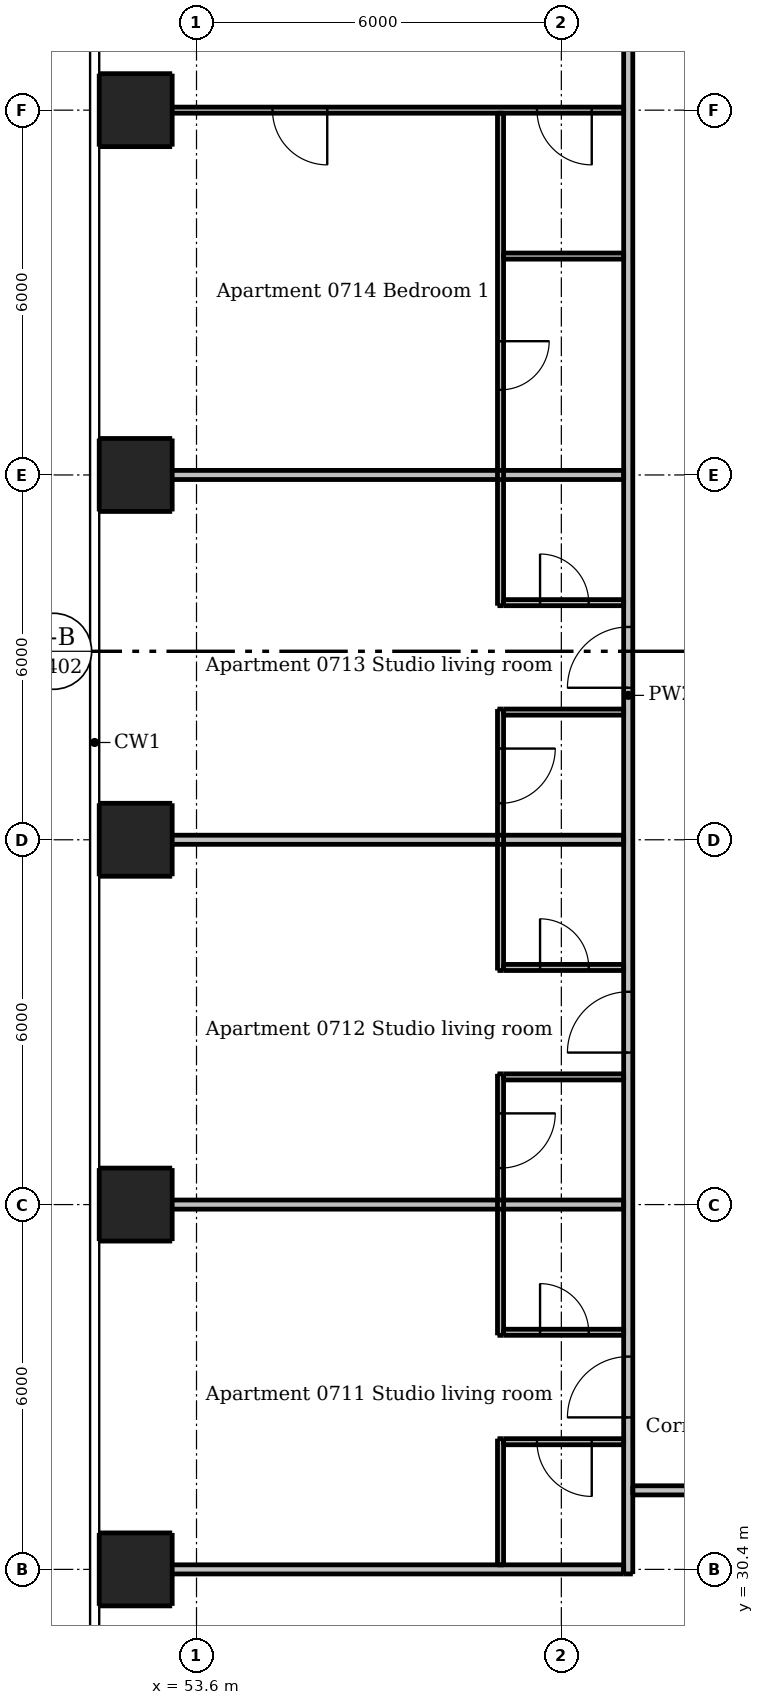
"""IFC4 building model, lengths in metres.
Left out: names, types, materials, properties, quantities, classifications, styles, units other than length and angle.
Written with IfcOpenShell. Run it as: python <this file> out.ifc"""

import sys

from ifc_helpers import new_model, si_unit, direction, frame, frame_2d, origin, origin_2d, place, context, subcontext, project, spatial, rectangle, extrude, element, fill, save


model = new_model("IFC4")
c1 = context("Model", 3, precision=1e-05, world=origin(), true_north=direction((0.0, 1.0)))
c2 = subcontext(c1, "Body", "Model", "MODEL_VIEW")
j1 = project(units=[si_unit("LENGTHUNIT", "METRE"), si_unit("PLANEANGLEUNIT", "RADIAN")], contexts=[c1])
p1 = place(None, origin())
s1 = spatial("IfcSite", under=j1, at=p1, CompositionType="ELEMENT")
p2 = place(p1, origin())
s2 = spatial("IfcBuilding", under=s1, at=p2, CompositionType="ELEMENT")
p3 = place(p2, frame((0.0, 0.0, 30.1)))
s3 = spatial("IfcBuildingStorey", under=s2, at=p3, CompositionType="ELEMENT", Elevation=30.1)
for number, where, z_axis, x_axis in (
    (1, (52.6, 30.4, 0.0), (0.0, 0.0, 1.0), (1.0, 0.0, 0.0)),
    (2, (52.6, 36.4, 0.0), (0.0, 0.0, 1.0), (1.0, 0.0, 0.0)),
    (3, (52.6, 42.4, 0.0), (0.0, 0.0, 1.0), (1.0, 0.0, 0.0)),
    (4, (52.6, 48.4, 0.0), (0.0, 0.0, 1.0), (1.0, 0.0, 0.0)),
    (5, (52.6, 54.4, 0.0), (0.0, 0.0, 1.0), (1.0, 0.0, 0.0)),
):
    element("IfcColumn", number, at=place(p3, frame(where, z_axis=z_axis, x_axis=x_axis)), inside=s3, PredefinedType="COLUMN", context=c2, shape_type="SweptSolid", body=[
        extrude(rectangle(XDim=1.2, YDim=1.2, at=origin_2d()), origin(), (0.0, 0.0, 1.0), 3.05),
    ])
p4 = place(p3, frame((58.6, 30.475, 0.0), z_axis=(0.0, 0.0, 1.0), x_axis=(0.0, 1.0, 0.0)))
e6 = element("IfcWall", 6, at=p4, inside=s3, PredefinedType="PARTITIONING", context=c2, shape_type="SweptSolid", body=[
    extrude(rectangle(XDim=2.075, YDim=0.1, at=frame_2d((1.038, 0.0))), origin(), (0.0, 0.0, 1.0), 3.05),
])
p5 = place(p3, frame((58.6, 38.55, 0.0), z_axis=(0.0, 0.0, 1.0), x_axis=(0.0, -1.0, 0.0)))
e7 = element("IfcWall", 7, at=p5, inside=s3, PredefinedType="PARTITIONING", context=c2, shape_type="SweptSolid", body=[
    extrude(rectangle(XDim=4.3, YDim=0.1, at=frame_2d((2.15, 0.0))), origin(), (0.0, 0.0, 1.0), 3.05),
])
p6 = place(p5, frame((0.65, 0.0, 0.0)))
e8 = element("IfcOpeningElement", 8, at=p6, cuts=e7, PredefinedType="OPENING", context=c2, shape_type="SweptSolid", body=[
    extrude(rectangle(XDim=0.9, YDim=2.1, at=frame_2d((0.45, 1.05))), frame((0.0, 0.06, 0.0), z_axis=(0.0, -1.0, 0.0), x_axis=(1.0, 0.0, 0.0)), (0.0, 0.0, 1.0), 0.12),
])
p7 = place(p3, frame((58.6, 44.55, 0.0), z_axis=(0.0, 0.0, 1.0), x_axis=(0.0, -1.0, 0.0)))
e9 = element("IfcWall", 9, at=p7, inside=s3, PredefinedType="PARTITIONING", context=c2, shape_type="SweptSolid", body=[
    extrude(rectangle(XDim=4.3, YDim=0.1, at=frame_2d((2.15, 0.0))), origin(), (0.0, 0.0, 1.0), 3.05),
])
p8 = place(p7, frame((0.65, 0.0, 0.0)))
e10 = element("IfcOpeningElement", 10, at=p8, cuts=e9, PredefinedType="OPENING", context=c2, shape_type="SweptSolid", body=[
    extrude(rectangle(XDim=0.9, YDim=2.1, at=frame_2d((0.45, 1.05))), frame((0.0, 0.06, 0.0), z_axis=(0.0, -1.0, 0.0), x_axis=(1.0, 0.0, 0.0)), (0.0, 0.0, 1.0), 0.12),
])
p9 = place(p3, frame((58.6, 54.35, 0.0), z_axis=(0.0, 0.0, 1.0), x_axis=(0.0, -1.0, 0.0)))
e11 = element("IfcWall", 11, at=p9, inside=s3, PredefinedType="PARTITIONING", context=c2, shape_type="SweptSolid", body=[
    extrude(rectangle(XDim=8.1, YDim=0.1, at=frame_2d((4.05, 0.0))), origin(), (0.0, 0.0, 1.0), 3.05),
])
p10 = place(p9, frame((3.75, 0.0, 0.0)))
e12 = element("IfcOpeningElement", 12, at=p10, cuts=e11, PredefinedType="OPENING", context=c2, shape_type="SweptSolid", body=[
    extrude(rectangle(XDim=0.8, YDim=2.1, at=frame_2d((0.4, 1.05))), frame((0.0, 0.06, 0.0), z_axis=(0.0, -1.0, 0.0), x_axis=(1.0, 0.0, 0.0)), (0.0, 0.0, 1.0), 0.12),
])
p11 = place(p3, frame((60.625, 54.4, 0.0), z_axis=(0.0, 0.0, 1.0), x_axis=(-1.0, 0.0, 0.0)))
e13 = element("IfcWall", 13, at=p11, inside=s3, PredefinedType="PARTITIONING", context=c2, shape_type="SweptSolid", body=[
    extrude(rectangle(XDim=8.625, YDim=0.1, at=frame_2d((4.312, 0.0))), origin(), (0.0, 0.0, 1.0), 2.516),
])
p12 = place(p11, frame((0.525, 0.0, 0.0)))
e14 = element("IfcOpeningElement", 14, at=p12, cuts=e13, PredefinedType="OPENING", context=c2, shape_type="SweptSolid", body=[
    extrude(rectangle(XDim=0.9, YDim=2.1, at=frame_2d((0.45, 1.05))), frame((0.0, 0.06, 0.0), z_axis=(0.0, -1.0, 0.0), x_axis=(1.0, 0.0, 0.0)), (0.0, 0.0, 1.0), 0.12),
])
p13 = place(p11, frame((4.875, 0.0, 0.0)))
e15 = element("IfcOpeningElement", 15, at=p13, cuts=e13, PredefinedType="OPENING", context=c2, shape_type="SweptSolid", body=[
    extrude(rectangle(XDim=0.9, YDim=2.1, at=frame_2d((0.45, 1.05))), frame((0.0, 0.06, 0.0), z_axis=(0.0, -1.0, 0.0), x_axis=(1.0, 0.0, 0.0)), (0.0, 0.0, 1.0), 0.12),
])
p14 = place(p3, frame((58.65, 52.0, 0.0), z_axis=(0.0, 0.0, 1.0), x_axis=(1.0, 0.0, 0.0)))
e16 = element("IfcWall", 16, at=p14, inside=s3, PredefinedType="PARTITIONING", context=c2, shape_type="SweptSolid", body=[
    extrude(rectangle(XDim=1.975, YDim=0.1, at=frame_2d((0.988, 0.0))), origin(), (0.0, 0.0, 1.0), 3.05),
])
p15 = place(p3, frame((58.65, 46.3, 0.0), z_axis=(0.0, 0.0, 1.0), x_axis=(1.0, 0.0, 0.0)))
e17 = element("IfcWall", 17, at=p15, inside=s3, PredefinedType="PARTITIONING", context=c2, shape_type="SweptSolid", body=[
    extrude(rectangle(XDim=1.975, YDim=0.1, at=frame_2d((0.988, 0.0))), origin(), (0.0, 0.0, 1.0), 3.05),
])
p16 = place(p15, frame((0.6, 0.0, 0.0)))
e18 = element("IfcOpeningElement", 18, at=p16, cuts=e17, PredefinedType="OPENING", context=c2, shape_type="SweptSolid", body=[
    extrude(rectangle(XDim=0.8, YDim=2.1, at=frame_2d((0.4, 1.05))), frame((0.0, 0.06, 0.0), z_axis=(0.0, -1.0, 0.0), x_axis=(1.0, 0.0, 0.0)), (0.0, 0.0, 1.0), 0.12),
])
p17 = place(p3, frame((58.65, 44.5, 0.0), z_axis=(0.0, 0.0, 1.0), x_axis=(1.0, 0.0, 0.0)))
e19 = element("IfcWall", 19, at=p17, inside=s3, PredefinedType="PARTITIONING", context=c2, shape_type="SweptSolid", body=[
    extrude(rectangle(XDim=1.975, YDim=0.1, at=frame_2d((0.988, 0.0))), origin(), (0.0, 0.0, 1.0), 3.05),
])
p18 = place(p3, frame((58.65, 40.3, 0.0), z_axis=(0.0, 0.0, 1.0), x_axis=(1.0, 0.0, 0.0)))
e20 = element("IfcWall", 20, at=p18, inside=s3, PredefinedType="PARTITIONING", context=c2, shape_type="SweptSolid", body=[
    extrude(rectangle(XDim=1.975, YDim=0.1, at=frame_2d((0.988, 0.0))), origin(), (0.0, 0.0, 1.0), 3.05),
])
p19 = place(p18, frame((0.6, 0.0, 0.0)))
e21 = element("IfcOpeningElement", 21, at=p19, cuts=e20, PredefinedType="OPENING", context=c2, shape_type="SweptSolid", body=[
    extrude(rectangle(XDim=0.8, YDim=2.1, at=frame_2d((0.4, 1.05))), frame((0.0, 0.06, 0.0), z_axis=(0.0, -1.0, 0.0), x_axis=(1.0, 0.0, 0.0)), (0.0, 0.0, 1.0), 0.12),
])
p20 = place(p3, frame((58.65, 38.5, 0.0), z_axis=(0.0, 0.0, 1.0), x_axis=(1.0, 0.0, 0.0)))
e22 = element("IfcWall", 22, at=p20, inside=s3, PredefinedType="PARTITIONING", context=c2, shape_type="SweptSolid", body=[
    extrude(rectangle(XDim=1.975, YDim=0.1, at=frame_2d((0.988, 0.0))), origin(), (0.0, 0.0, 1.0), 3.05),
])
p21 = place(p3, frame((58.65, 34.3, 0.0), z_axis=(0.0, 0.0, 1.0), x_axis=(1.0, 0.0, 0.0)))
e23 = element("IfcWall", 23, at=p21, inside=s3, PredefinedType="PARTITIONING", context=c2, shape_type="SweptSolid", body=[
    extrude(rectangle(XDim=1.975, YDim=0.1, at=frame_2d((0.988, 0.0))), origin(), (0.0, 0.0, 1.0), 3.05),
])
p22 = place(p21, frame((0.6, 0.0, 0.0)))
e24 = element("IfcOpeningElement", 24, at=p22, cuts=e23, PredefinedType="OPENING", context=c2, shape_type="SweptSolid", body=[
    extrude(rectangle(XDim=0.8, YDim=2.1, at=frame_2d((0.4, 1.05))), frame((0.0, 0.06, 0.0), z_axis=(0.0, -1.0, 0.0), x_axis=(1.0, 0.0, 0.0)), (0.0, 0.0, 1.0), 0.12),
])
p23 = place(p3, frame((60.625, 32.5, 0.0), z_axis=(0.0, 0.0, 1.0), x_axis=(-1.0, 0.0, 0.0)))
e25 = element("IfcWall", 25, at=p23, inside=s3, PredefinedType="PARTITIONING", context=c2, shape_type="SweptSolid", body=[
    extrude(rectangle(XDim=1.975, YDim=0.1, at=frame_2d((0.988, 0.0))), origin(), (0.0, 0.0, 1.0), 3.05),
])
p24 = place(p23, frame((0.525, 0.0, 0.0)))
e26 = element("IfcOpeningElement", 26, at=p24, cuts=e25, PredefinedType="OPENING", context=c2, shape_type="SweptSolid", body=[
    extrude(rectangle(XDim=0.9, YDim=2.1, at=frame_2d((0.45, 1.05))), frame((0.0, 0.06, 0.0), z_axis=(0.0, -1.0, 0.0), x_axis=(1.0, 0.0, 0.0)), (0.0, 0.0, 1.0), 0.12),
])
p25 = place(p3, frame((60.7, 30.325, 0.0), z_axis=(0.0, 0.0, 1.0), x_axis=(0.0, 1.0, 0.0)))
e27 = element("IfcWall", 27, at=p25, inside=s3, PredefinedType="PARTITIONING", context=c2, shape_type="SweptSolid", body=[
    extrude(rectangle(XDim=28.9, YDim=0.15, at=frame_2d((14.45, 0.0))), origin(), (0.0, 0.0, 1.0), 3.05),
])
p26 = place(p25, frame((2.575, 0.0, 0.0)))
e28 = element("IfcOpeningElement", 28, at=p26, cuts=e27, PredefinedType="OPENING", context=c2, shape_type="SweptSolid", body=[
    extrude(rectangle(XDim=1.0, YDim=2.1, at=frame_2d((0.5, 1.05))), frame((0.0, 0.085, 0.0), z_axis=(0.0, -1.0, 0.0), x_axis=(1.0, 0.0, 0.0)), (0.0, 0.0, 1.0), 0.17),
])
p27 = place(p25, frame((8.575, 0.0, 0.0)))
e29 = element("IfcOpeningElement", 29, at=p27, cuts=e27, PredefinedType="OPENING", context=c2, shape_type="SweptSolid", body=[
    extrude(rectangle(XDim=1.0, YDim=2.1, at=frame_2d((0.5, 1.05))), frame((0.0, 0.085, 0.0), z_axis=(0.0, -1.0, 0.0), x_axis=(1.0, 0.0, 0.0)), (0.0, 0.0, 1.0), 0.17),
])
p28 = place(p25, frame((14.575, 0.0, 0.0)))
e30 = element("IfcOpeningElement", 30, at=p28, cuts=e27, PredefinedType="OPENING", context=c2, shape_type="SweptSolid", body=[
    extrude(rectangle(XDim=1.0, YDim=2.1, at=frame_2d((0.5, 1.05))), frame((0.0, 0.085, 0.0), z_axis=(0.0, -1.0, 0.0), x_axis=(1.0, 0.0, 0.0)), (0.0, 0.0, 1.0), 0.17),
])
p29 = place(p25, frame((26.025, 0.0, 0.0)))
e31 = element("IfcOpeningElement", 31, at=p29, cuts=e27, PredefinedType="OPENING", context=c2, shape_type="SweptSolid", body=[
    extrude(rectangle(XDim=1.0, YDim=2.1, at=frame_2d((0.5, 1.05))), frame((0.0, 0.085, 0.0), z_axis=(0.0, -1.0, 0.0), x_axis=(1.0, 0.0, 0.0)), (0.0, 0.0, 1.0), 0.17),
])
for number, where, z_axis, x_axis in (
    (32, (52.0, 48.4, 0.0), (0.0, 0.0, 1.0), (1.0, 0.0, 0.0)),
    (33, (52.0, 42.4, 0.0), (0.0, 0.0, 1.0), (1.0, 0.0, 0.0)),
    (34, (52.0, 36.4, 0.0), (0.0, 0.0, 1.0), (1.0, 0.0, 0.0)),
):
    element("IfcWall", number, at=place(p3, frame(where, z_axis=z_axis, x_axis=x_axis)), inside=s3, PredefinedType="PARTITIONING", context=c2, shape_type="SweptSolid", body=[
        extrude(rectangle(XDim=8.625, YDim=0.15, at=frame_2d((4.312, 0.0))), origin(), (0.0, 0.0, 1.0), 2.516),
    ])
p30 = place(p3, frame((89.525, 31.7, 0.0), z_axis=(0.0, 0.0, 1.0), x_axis=(-1.0, 0.0, 0.0)))
e35 = element("IfcWall", 35, at=p30, inside=s3, PredefinedType="PARTITIONING", context=c2, shape_type="SweptSolid", body=[
    extrude(rectangle(XDim=28.75, YDim=0.15, at=frame_2d((14.375, 0.0))), origin(), (0.0, 0.0, 1.0), 3.05),
])
p31 = place(p30, frame((24.625, 0.0, 0.0)))
e36 = element("IfcOpeningElement", 36, at=p31, cuts=e35, PredefinedType="OPENING", context=c2, shape_type="SweptSolid", body=[
    extrude(rectangle(XDim=1.0, YDim=2.1, at=frame_2d((0.5, 1.05))), frame((0.0, 0.085, 0.0), z_axis=(0.0, -1.0, 0.0), x_axis=(1.0, 0.0, 0.0)), (0.0, 0.0, 1.0), 0.17),
])
p32 = place(p30, frame((10.225, 0.0, 0.0)))
e37 = element("IfcOpeningElement", 37, at=p32, cuts=e35, PredefinedType="OPENING", context=c2, shape_type="SweptSolid", body=[
    extrude(rectangle(XDim=1.0, YDim=2.1, at=frame_2d((0.5, 1.05))), frame((0.0, 0.085, 0.0), z_axis=(0.0, -1.0, 0.0), x_axis=(1.0, 0.0, 0.0)), (0.0, 0.0, 1.0), 0.17),
])
p33 = place(p30, frame((2.425, 0.0, 0.0)))
e38 = element("IfcOpeningElement", 38, at=p33, cuts=e35, PredefinedType="OPENING", context=c2, shape_type="SweptSolid", body=[
    extrude(rectangle(XDim=1.0, YDim=2.1, at=frame_2d((0.5, 1.05))), frame((0.0, 0.085, 0.0), z_axis=(0.0, -1.0, 0.0), x_axis=(1.0, 0.0, 0.0)), (0.0, 0.0, 1.0), 0.17),
])
p34 = place(p3, frame((52.0, 30.4, 0.0), z_axis=(0.0, 0.0, 1.0), x_axis=(1.0, 0.0, 0.0)))
e39 = element("IfcWall", 39, at=p34, inside=s3, PredefinedType="PARTITIONING", context=c2, shape_type="SweptSolid", body=[
    extrude(rectangle(XDim=8.625, YDim=0.15, at=frame_2d((4.312, 0.0))), origin(), (0.0, 0.0, 1.0), 2.647),
])
p35 = place(p26, origin())
e40 = element("IfcDoor", 40, at=p35, inside=s3, OperationType="SINGLE_SWING_LEFT", PredefinedType="DOOR", context=c2, shape_type="SweptSolid", body=[
    extrude(rectangle(XDim=1.0, YDim=2.1, at=frame_2d((0.5, 1.05))), frame((0.0, 0.025, 0.0), z_axis=(0.0, -1.0, 0.0), x_axis=(1.0, 0.0, 0.0)), (0.0, 0.0, 1.0), 0.05),
])
fill(e28, e40)
p36 = place(p24, origin())
e41 = element("IfcDoor", 41, at=p36, inside=s3, OperationType="SINGLE_SWING_LEFT", PredefinedType="DOOR", context=c2, shape_type="SweptSolid", body=[
    extrude(rectangle(XDim=0.9, YDim=2.1, at=frame_2d((0.45, 1.05))), frame((0.0, 0.025, 0.0), z_axis=(0.0, -1.0, 0.0), x_axis=(1.0, 0.0, 0.0)), (0.0, 0.0, 1.0), 0.05),
])
fill(e26, e41)
p37 = place(p22, origin())
e42 = element("IfcDoor", 42, at=p37, inside=s3, OperationType="SINGLE_SWING_LEFT", PredefinedType="DOOR", context=c2, shape_type="SweptSolid", body=[
    extrude(rectangle(XDim=0.8, YDim=2.1, at=frame_2d((0.4, 1.05))), frame((0.0, 0.025, 0.0), z_axis=(0.0, -1.0, 0.0), x_axis=(1.0, 0.0, 0.0)), (0.0, 0.0, 1.0), 0.05),
])
fill(e24, e42)
p38 = place(p27, origin())
e43 = element("IfcDoor", 43, at=p38, inside=s3, OperationType="SINGLE_SWING_LEFT", PredefinedType="DOOR", context=c2, shape_type="SweptSolid", body=[
    extrude(rectangle(XDim=1.0, YDim=2.1, at=frame_2d((0.5, 1.05))), frame((0.0, 0.025, 0.0), z_axis=(0.0, -1.0, 0.0), x_axis=(1.0, 0.0, 0.0)), (0.0, 0.0, 1.0), 0.05),
])
fill(e29, e43)
p39 = place(p6, origin())
e44 = element("IfcDoor", 44, at=p39, inside=s3, OperationType="SINGLE_SWING_LEFT", PredefinedType="DOOR", context=c2, shape_type="SweptSolid", body=[
    extrude(rectangle(XDim=0.9, YDim=2.1, at=frame_2d((0.45, 1.05))), frame((0.0, 0.025, 0.0), z_axis=(0.0, -1.0, 0.0), x_axis=(1.0, 0.0, 0.0)), (0.0, 0.0, 1.0), 0.05),
])
fill(e8, e44)
p40 = place(p19, origin())
e45 = element("IfcDoor", 45, at=p40, inside=s3, OperationType="SINGLE_SWING_LEFT", PredefinedType="DOOR", context=c2, shape_type="SweptSolid", body=[
    extrude(rectangle(XDim=0.8, YDim=2.1, at=frame_2d((0.4, 1.05))), frame((0.0, 0.025, 0.0), z_axis=(0.0, -1.0, 0.0), x_axis=(1.0, 0.0, 0.0)), (0.0, 0.0, 1.0), 0.05),
])
fill(e21, e45)
p41 = place(p28, origin())
e46 = element("IfcDoor", 46, at=p41, inside=s3, OperationType="SINGLE_SWING_LEFT", PredefinedType="DOOR", context=c2, shape_type="SweptSolid", body=[
    extrude(rectangle(XDim=1.0, YDim=2.1, at=frame_2d((0.5, 1.05))), frame((0.0, 0.025, 0.0), z_axis=(0.0, -1.0, 0.0), x_axis=(1.0, 0.0, 0.0)), (0.0, 0.0, 1.0), 0.05),
])
fill(e30, e46)
p42 = place(p8, origin())
e47 = element("IfcDoor", 47, at=p42, inside=s3, OperationType="SINGLE_SWING_LEFT", PredefinedType="DOOR", context=c2, shape_type="SweptSolid", body=[
    extrude(rectangle(XDim=0.9, YDim=2.1, at=frame_2d((0.45, 1.05))), frame((0.0, 0.025, 0.0), z_axis=(0.0, -1.0, 0.0), x_axis=(1.0, 0.0, 0.0)), (0.0, 0.0, 1.0), 0.05),
])
fill(e10, e47)
p43 = place(p16, origin())
e48 = element("IfcDoor", 48, at=p43, inside=s3, OperationType="SINGLE_SWING_LEFT", PredefinedType="DOOR", context=c2, shape_type="SweptSolid", body=[
    extrude(rectangle(XDim=0.8, YDim=2.1, at=frame_2d((0.4, 1.05))), frame((0.0, 0.025, 0.0), z_axis=(0.0, -1.0, 0.0), x_axis=(1.0, 0.0, 0.0)), (0.0, 0.0, 1.0), 0.05),
])
fill(e18, e48)
p44 = place(p12, origin())
e49 = element("IfcDoor", 49, at=p44, inside=s3, OperationType="SINGLE_SWING_LEFT", PredefinedType="DOOR", context=c2, shape_type="SweptSolid", body=[
    extrude(rectangle(XDim=0.9, YDim=2.1, at=frame_2d((0.45, 1.05))), frame((0.0, 0.025, 0.0), z_axis=(0.0, -1.0, 0.0), x_axis=(1.0, 0.0, 0.0)), (0.0, 0.0, 1.0), 0.05),
])
fill(e14, e49)
p45 = place(p13, origin())
e50 = element("IfcDoor", 50, at=p45, inside=s3, OperationType="SINGLE_SWING_LEFT", PredefinedType="DOOR", context=c2, shape_type="SweptSolid", body=[
    extrude(rectangle(XDim=0.9, YDim=2.1, at=frame_2d((0.45, 1.05))), frame((0.0, 0.025, 0.0), z_axis=(0.0, -1.0, 0.0), x_axis=(1.0, 0.0, 0.0)), (0.0, 0.0, 1.0), 0.05),
])
fill(e15, e50)
p46 = place(p10, origin())
e51 = element("IfcDoor", 51, at=p46, inside=s3, OperationType="SINGLE_SWING_LEFT", PredefinedType="DOOR", context=c2, shape_type="SweptSolid", body=[
    extrude(rectangle(XDim=0.8, YDim=2.1, at=frame_2d((0.4, 1.05))), frame((0.0, 0.025, 0.0), z_axis=(0.0, -1.0, 0.0), x_axis=(1.0, 0.0, 0.0)), (0.0, 0.0, 1.0), 0.05),
])
fill(e12, e51)
save(model, sys.argv[1])
